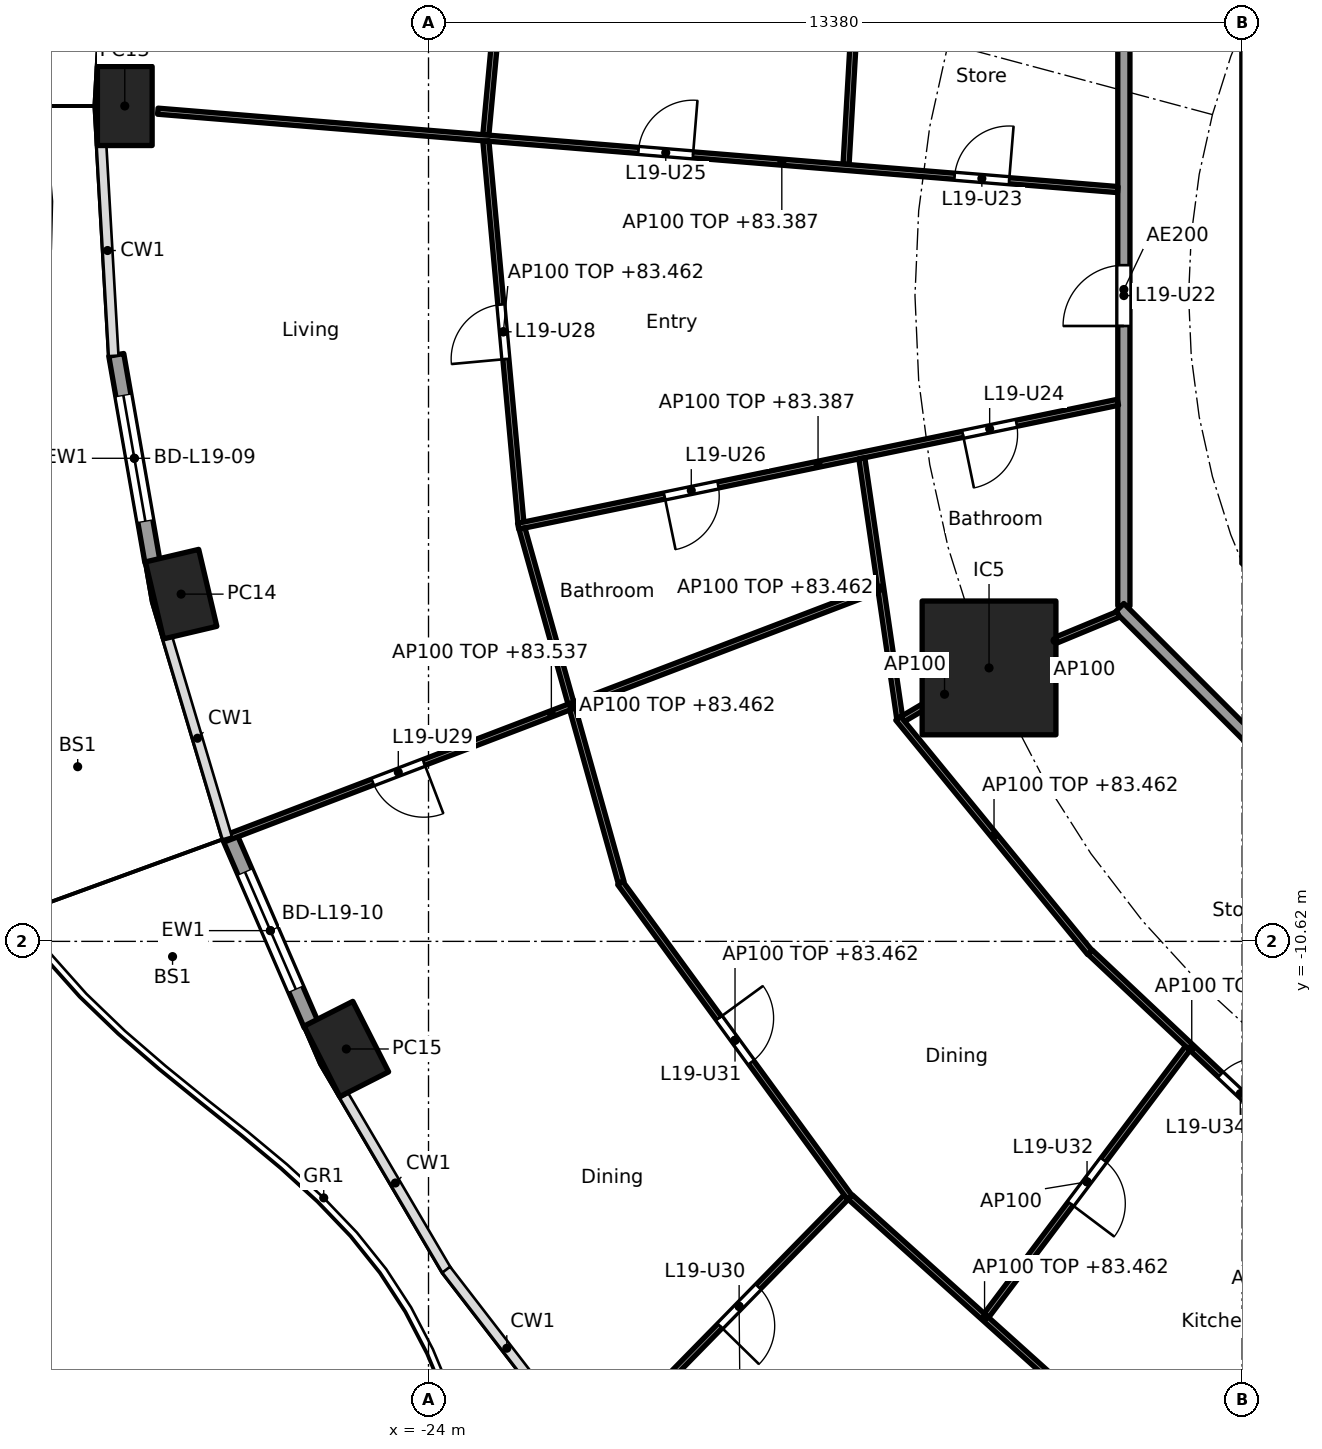
"""IFC4 building model, lengths in metres.
Left out: names, types, materials, properties, quantities, classifications, styles, units other than length and angle.
Written with IfcOpenShell. Run it as: python <this file> out.ifc"""

import sys

from ifc_helpers import new_model, si_unit, direction, frame, frame_2d, origin, origin_2d, place, context, subcontext, project, spatial, polyline, rectangle, hollow_rectangle, outline, extrude, element, fill, save


model = new_model("IFC4")
c1 = context("Model", 3, precision=1e-05, world=origin(), true_north=direction((0.0, 1.0)))
c2 = subcontext(c1, "Body", "Model", "MODEL_VIEW")
j1 = project(units=[si_unit("LENGTHUNIT", "METRE"), si_unit("PLANEANGLEUNIT", "RADIAN")], contexts=[c1])
p1 = place(None, origin())
s1 = spatial("IfcSite", under=j1, at=p1, CompositionType="ELEMENT")
p2 = place(p1, origin())
s2 = spatial("IfcBuilding", under=s1, at=p2, CompositionType="ELEMENT")
p3 = place(p2, frame((0.0, 0.0, 80.7)))
s3 = spatial("IfcBuildingStorey", under=s2, at=p3, CompositionType="ELEMENT", Elevation=80.7)
for number, where, z_axis, x_axis in (
    (1, (-28.995, 3.118, 0.0), (0.0, 0.0, 1.0), (0.0, -1.0, 0.0)),
    (2, (-28.068, -4.91, 0.0), (0.0, 0.0, 1.0), (0.229, -0.973, 0.0)),
    (3, (-25.352, -12.39, 0.0), (0.0, 0.0, 1.0), (0.452, -0.892, 0.0)),
):
    element("IfcColumn", number, at=place(p3, frame(where, z_axis=z_axis, x_axis=x_axis)), inside=s3, PredefinedType="COLUMN", context=c2, shape_type="SweptSolid", body=[
        extrude(hollow_rectangle(XDim=1.3, YDim=0.9, WallThickness=0.045, at=origin_2d()), origin(), (0.0, 0.0, 1.0), 3.7),
    ])
p4 = place(p3, frame((-14.782, -6.123, 0.0), z_axis=(0.0, 0.0, 1.0), x_axis=(1.0, 0.0, 0.0)))
e4 = element("IfcColumn", 4, at=p4, inside=s3, PredefinedType="COLUMN", context=c2, shape_type="SweptSolid", body=[
    extrude(rectangle(XDim=2.2, YDim=2.2, at=origin_2d()), origin(), (0.0, 0.0, 1.0), 3.7),
])
p5 = place(p3, frame((-28.54, -4.377, 0.0), z_axis=(0.0, 0.0, 1.0), x_axis=(-0.17223289558, 0.985056257114, 0.0)))
e5 = element("IfcWall", 5, at=p5, inside=s3, PredefinedType="SOLIDWALL", context=c2, shape_type="SweptSolid", body=[
    extrude(rectangle(XDim=3.454, YDim=0.25, at=frame_2d((1.727, 0.0))), origin(), (0.0, 0.0, 1.0), 3.44),
])
p6 = place(p5, frame((0.677, 0.0, 0.0)))
e6 = element("IfcOpeningElement", 6, at=p6, cuts=e5, PredefinedType="OPENING", context=c2, shape_type="SweptSolid", body=[
    extrude(rectangle(XDim=2.1, YDim=2.4, at=frame_2d((1.05, 1.2))), frame((0.0, 0.135, 0.0), z_axis=(0.0, -1.0, 0.0), x_axis=(1.0, 0.0, 0.0)), (0.0, 0.0, 1.0), 0.27),
])
p7 = place(p3, frame((-25.928, -11.994, 0.0), z_axis=(0.0, 0.0, 1.0), x_axis=(-0.397682447205, 0.917523117521, 0.0)))
e7 = element("IfcWall", 7, at=p7, inside=s3, PredefinedType="SOLIDWALL", context=c2, shape_type="SweptSolid", body=[
    extrude(rectangle(XDim=3.38, YDim=0.25, at=frame_2d((1.69, 0.0))), origin(), (0.0, 0.0, 1.0), 3.44),
])
p8 = place(p7, frame((0.64, 0.0, 0.0)))
e8 = element("IfcOpeningElement", 8, at=p8, cuts=e7, PredefinedType="OPENING", context=c2, shape_type="SweptSolid", body=[
    extrude(rectangle(XDim=2.1, YDim=2.4, at=frame_2d((1.05, 1.2))), frame((0.0, 0.135, 0.0), z_axis=(0.0, -1.0, 0.0), x_axis=(1.0, 0.0, 0.0)), (0.0, 0.0, 1.0), 0.27),
])
p9 = place(p3, frame((-10.325, 3.801, 0.0), z_axis=(0.0, 0.0, 1.0), x_axis=(0.0, -1.0, 0.0)))
e9 = element("IfcWall", 9, at=p9, inside=s3, PredefinedType="SHEAR", context=c2, shape_type="SweptSolid", body=[
    extrude(rectangle(XDim=7.602, YDim=0.6, at=frame_2d((3.801, 0.0))), origin(), (0.0, 0.0, 1.0), 3.44),
])
p10 = place(p9, frame((0.651, 0.0, 0.0)))
e10 = element("IfcOpeningElement", 10, at=p10, cuts=e9, PredefinedType="OPENING", context=c2, shape_type="SweptSolid", body=[
    extrude(rectangle(XDim=1.5, YDim=2.1, at=frame_2d((0.75, 1.05))), frame((0.0, 0.31, 0.0), z_axis=(0.0, -1.0, 0.0), x_axis=(1.0, 0.0, 0.0)), (0.0, 0.0, 1.0), 0.62),
])
p11 = place(p9, frame((5.451, 0.0, 0.0)))
e11 = element("IfcOpeningElement", 11, at=p11, cuts=e9, PredefinedType="OPENING", context=c2, shape_type="SweptSolid", body=[
    extrude(rectangle(XDim=1.5, YDim=2.1, at=frame_2d((0.75, 1.05))), frame((0.0, 0.31, 0.0), z_axis=(0.0, -1.0, 0.0), x_axis=(1.0, 0.0, 0.0)), (0.0, 0.0, 1.0), 0.62),
])
p12 = place(p3, origin())
e12 = element("IfcWall", 12, at=p12, inside=s3, PredefinedType="SHEAR", context=c2, shape_type="SweptSolid", body=[
    extrude(outline(polyline([(-10.625, -3.801), (-10.025, -3.801), (-10.025, -4.152), (-9.776, -4.401), (-10.2, -4.825), (-10.625, -4.401), (-10.625, -3.801)])), origin(), (0.0, 0.0, 1.0), 3.44),
])
p13 = place(p3, origin())
e13 = element("IfcWall", 13, at=p13, inside=s3, PredefinedType="SHEAR", context=c2, shape_type="SweptSolid", body=[
    extrude(outline(polyline([(-10.2, 4.825), (-9.776, 4.401), (-10.025, 4.152), (-10.025, 3.801), (-10.625, 3.801), (-10.625, 4.401), (-10.2, 4.825)])), origin(), (0.0, 0.0, 1.0), 3.44),
])
p14 = place(p3, frame((-12.565, 5.304, 0.0), z_axis=(0.0, 0.0, 1.0), x_axis=(0.0, -1.0, 0.0)))
e14 = element("IfcWall", 14, at=p14, inside=s3, PredefinedType="PARTITIONING", context=c2, shape_type="SweptSolid", body=[
    extrude(rectangle(XDim=10.409, YDim=0.2, at=frame_2d((5.205, 0.0))), origin(), (0.0, 0.0, 1.0), 3.44),
])
p15 = place(p14, frame((4.804, 0.0, 0.0)))
e15 = element("IfcOpeningElement", 15, at=p15, cuts=e14, PredefinedType="OPENING", context=c2, shape_type="SweptSolid", body=[
    extrude(rectangle(XDim=1.0, YDim=2.1, at=frame_2d((0.5, 1.05))), frame((0.0, 0.11, 0.0), z_axis=(0.0, -1.0, 0.0), x_axis=(1.0, 0.0, 0.0)), (0.0, 0.0, 1.0), 0.22),
])
p16 = place(p3, frame((-12.635, -5.134, 0.0), z_axis=(0.0, 0.0, 1.0), x_axis=(0.707106781187, -0.707106781187, 0.0)))
e16 = element("IfcWall", 16, at=p16, inside=s3, PredefinedType="PARTITIONING", context=c2, shape_type="SweptSolid", body=[
    extrude(rectangle(XDim=10.609, YDim=0.2, at=frame_2d((5.305, 0.0))), origin(), (0.0, 0.0, 1.0), 3.44),
])
p17 = place(p3, frame((-16.865, 6.8, 0.0), z_axis=(0.0, 0.0, 1.0), x_axis=(-0.057758567218, -0.998330580476, 0.0)))
e17 = element("IfcWall", 17, at=p17, inside=s3, PredefinedType="PARTITIONING", context=c2, shape_type="SweptSolid", body=[
    extrude(rectangle(XDim=4.65, YDim=0.1, at=frame_2d((2.325, 0.0))), origin(), (0.0, 0.0, 1.0), 2.762),
])
p18 = place(p3, frame((-22.474, 8.898, 0.0), z_axis=(0.0, 0.0, 1.0), x_axis=(-0.092756864489, -0.995688788774, 0.0)))
e18 = element("IfcWall", 18, at=p18, inside=s3, PredefinedType="PARTITIONING", context=c2, shape_type="SweptSolid", body=[
    extrude(rectangle(XDim=6.283, YDim=0.1, at=frame_2d((3.141, 0.0))), origin(), (0.0, 0.0, 1.0), 2.762),
])
p19 = place(p18, frame((2.691, 0.0, 0.0)))
e19 = element("IfcOpeningElement", 19, at=p19, cuts=e18, PredefinedType="OPENING", context=c2, shape_type="SweptSolid", body=[
    extrude(rectangle(XDim=0.9, YDim=2.1, at=frame_2d((0.45, 1.05))), frame((0.0, 0.06, 0.0), z_axis=(0.0, -1.0, 0.0), x_axis=(1.0, 0.0, 0.0)), (0.0, 0.0, 1.0), 0.12),
])
p20 = place(p3, frame((-12.665, 1.743, 0.0), z_axis=(0.0, 0.0, 1.0), x_axis=(-0.996680482238, 0.081412630013, 0.0)))
e20 = element("IfcWall", 20, at=p20, inside=s3, PredefinedType="PARTITIONING", context=c2, shape_type="SweptSolid", body=[
    extrude(rectangle(XDim=15.84, YDim=0.1, at=frame_2d((7.92, 0.0))), origin(), (0.0, 0.0, 1.0), 2.687),
])
p21 = place(p20, frame((1.793, 0.0, 0.0)))
e21 = element("IfcOpeningElement", 21, at=p21, cuts=e20, PredefinedType="OPENING", context=c2, shape_type="SweptSolid", body=[
    extrude(rectangle(XDim=0.9, YDim=2.1, at=frame_2d((0.45, 1.05))), frame((0.0, 0.06, 0.0), z_axis=(0.0, -1.0, 0.0), x_axis=(1.0, 0.0, 0.0)), (0.0, 0.0, 1.0), 0.12),
])
p22 = place(p20, frame((7.009, 0.0, 0.0)))
e22 = element("IfcOpeningElement", 22, at=p22, cuts=e20, PredefinedType="OPENING", context=c2, shape_type="SweptSolid", body=[
    extrude(rectangle(XDim=0.9, YDim=2.1, at=frame_2d((0.45, 1.05))), frame((0.0, 0.06, 0.0), z_axis=(0.0, -1.0, 0.0), x_axis=(1.0, 0.0, 0.0)), (0.0, 0.0, 1.0), 0.12),
])
p23 = place(p3, frame((-23.057, 2.542, 0.0), z_axis=(0.0, 0.0, 1.0), x_axis=(0.091380945427, -0.995816008514, 0.0)))
e23 = element("IfcWall", 23, at=p23, inside=s3, PredefinedType="PARTITIONING", context=c2, shape_type="SweptSolid", body=[
    extrude(rectangle(XDim=6.302, YDim=0.1, at=frame_2d((3.151, 0.0))), origin(), (0.0, 0.0, 1.0), 2.762),
])
p24 = place(p23, frame((2.701, 0.0, 0.0)))
e24 = element("IfcOpeningElement", 24, at=p24, cuts=e23, PredefinedType="OPENING", context=c2, shape_type="SweptSolid", body=[
    extrude(rectangle(XDim=0.9, YDim=2.1, at=frame_2d((0.45, 1.05))), frame((0.0, 0.06, 0.0), z_axis=(0.0, -1.0, 0.0), x_axis=(1.0, 0.0, 0.0)), (0.0, 0.0, 1.0), 0.12),
])
p25 = place(p3, frame((-12.663, -1.755, 0.0), z_axis=(0.0, 0.0, 1.0), x_axis=(-0.979304677471, -0.202391572657, 0.0)))
e25 = element("IfcWall", 25, at=p25, inside=s3, PredefinedType="PARTITIONING", context=c2, shape_type="SweptSolid", body=[
    extrude(rectangle(XDim=10.071, YDim=0.1, at=frame_2d((5.036, 0.0))), origin(), (0.0, 0.0, 1.0), 2.687),
])
p26 = place(p25, frame((1.704, 0.0, 0.0)))
e26 = element("IfcOpeningElement", 26, at=p26, cuts=e25, PredefinedType="OPENING", context=c2, shape_type="SweptSolid", body=[
    extrude(rectangle(XDim=0.9, YDim=2.1, at=frame_2d((0.45, 1.05))), frame((0.0, 0.06, 0.0), z_axis=(0.0, -1.0, 0.0), x_axis=(1.0, 0.0, 0.0)), (0.0, 0.0, 1.0), 0.12),
])
p27 = place(p25, frame((6.714, 0.0, 0.0)))
e27 = element("IfcOpeningElement", 27, at=p27, cuts=e25, PredefinedType="OPENING", context=c2, shape_type="SweptSolid", body=[
    extrude(rectangle(XDim=0.9, YDim=2.1, at=frame_2d((0.45, 1.05))), frame((0.0, 0.06, 0.0), z_axis=(0.0, -1.0, 0.0), x_axis=(1.0, 0.0, 0.0)), (0.0, 0.0, 1.0), 0.12),
])
p28 = place(p3, frame((-16.874, -2.677, 0.0), z_axis=(0.0, 0.0, 1.0), x_axis=(0.144260658133, -0.989539722555, 0.0)))
e28 = element("IfcWall", 28, at=p28, inside=s3, PredefinedType="PARTITIONING", context=c2, shape_type="SweptSolid", body=[
    extrude(rectangle(XDim=4.309, YDim=0.1, at=frame_2d((2.154, 0.0))), origin(), (0.0, 0.0, 1.0), 2.762),
])
p29 = place(p3, frame((-22.463, -3.832, 0.0), z_axis=(0.0, 0.0, 1.0), x_axis=(0.269797759333, -0.962917010473, 0.0)))
e29 = element("IfcWall", 29, at=p29, inside=s3, PredefinedType="PARTITIONING", context=c2, shape_type="SweptSolid", body=[
    extrude(rectangle(XDim=6.043, YDim=0.1, at=frame_2d((3.021, 0.0))), origin(), (0.0, 0.0, 1.0), 2.762),
])
p30 = place(p3, frame((-16.61, -4.826, 0.0), z_axis=(0.0, 0.0, 1.0), x_axis=(-0.934174502909, -0.356816476798, 0.0)))
e30 = element("IfcWall", 30, at=p30, inside=s3, PredefinedType="PARTITIONING", context=c2, shape_type="SweptSolid", body=[
    extrude(rectangle(XDim=11.496, YDim=0.1, at=frame_2d((5.748, 0.0))), origin(), (0.0, 0.0, 1.0), 2.837),
])
p31 = place(p30, frame((7.993, 0.0, 0.0)))
e31 = element("IfcOpeningElement", 31, at=p31, cuts=e30, PredefinedType="OPENING", context=c2, shape_type="SweptSolid", body=[
    extrude(rectangle(XDim=0.9, YDim=2.1, at=frame_2d((0.45, 1.05))), frame((0.0, 0.06, 0.0), z_axis=(0.0, -1.0, 0.0), x_axis=(1.0, 0.0, 0.0)), (0.0, 0.0, 1.0), 0.12),
])
p32 = place(p3, frame((-12.657, -5.243, 0.0), z_axis=(0.0, 0.0, 1.0), x_axis=(-0.923864733477, -0.382719158442, 0.0)))
e32 = element("IfcWall", 32, at=p32, inside=s3, PredefinedType="PARTITIONING", context=c2, shape_type="SweptSolid", body=[
    extrude(rectangle(XDim=2.25, YDim=0.1, at=frame_2d((1.125, 0.0))), origin(), (0.0, 0.0, 1.0), 3.44),
])
p33 = place(p3, frame((-14.825, -6.148, 0.0), z_axis=(0.0, 0.0, 1.0), x_axis=(-0.860452514841, -0.509530636669, 0.0)))
e33 = element("IfcWall", 33, at=p33, inside=s3, PredefinedType="PARTITIONING", context=c2, shape_type="SweptSolid", body=[
    extrude(rectangle(XDim=1.601, YDim=0.1, at=frame_2d((0.8, 0.0))), origin(), (0.0, 0.0, 1.0), 3.44),
])
p34 = place(p3, frame((-16.277, -6.951, 0.0), z_axis=(0.0, 0.0, 1.0), x_axis=(0.633427340372, -0.773802173988, 0.0)))
e34 = element("IfcWall", 34, at=p34, inside=s3, PredefinedType="PARTITIONING", context=c2, shape_type="SweptSolid", body=[
    extrude(rectangle(XDim=4.979, YDim=0.1, at=frame_2d((2.49, 0.0))), origin(), (0.0, 0.0, 1.0), 2.762),
])
p35 = place(p3, frame((-20.848, -9.658, 0.0), z_axis=(0.0, 0.0, 1.0), x_axis=(0.5895799361, -0.807710033953, 0.0)))
e35 = element("IfcWall", 35, at=p35, inside=s3, PredefinedType="PARTITIONING", context=c2, shape_type="SweptSolid", body=[
    extrude(rectangle(XDim=6.408, YDim=0.1, at=frame_2d((3.204, 0.0))), origin(), (0.0, 0.0, 1.0), 2.762),
])
p36 = place(p35, frame((2.754, 0.0, 0.0)))
e36 = element("IfcOpeningElement", 36, at=p36, cuts=e35, PredefinedType="OPENING", context=c2, shape_type="SweptSolid", body=[
    extrude(rectangle(XDim=0.9, YDim=2.1, at=frame_2d((0.45, 1.05))), frame((0.0, 0.06, 0.0), z_axis=(0.0, -1.0, 0.0), x_axis=(1.0, 0.0, 0.0)), (0.0, 0.0, 1.0), 0.12),
])
p37 = place(p3, frame((-13.118, -10.8, 0.0), z_axis=(0.0, 0.0, 1.0), x_axis=(0.72818280142, -0.685382964273, 0.0)))
e37 = element("IfcWall", 37, at=p37, inside=s3, PredefinedType="PARTITIONING", context=c2, shape_type="SweptSolid", body=[
    extrude(rectangle(XDim=4.586, YDim=0.1, at=frame_2d((2.293, 0.0))), origin(), (0.0, 0.0, 1.0), 2.762),
])
p38 = place(p37, frame((2.94, 0.0, 0.0)))
e38 = element("IfcOpeningElement", 38, at=p38, cuts=e37, PredefinedType="OPENING", context=c2, shape_type="SweptSolid", body=[
    extrude(rectangle(XDim=0.9, YDim=2.1, at=frame_2d((0.45, 1.05))), frame((0.0, 0.06, 0.0), z_axis=(0.0, -1.0, 0.0), x_axis=(1.0, 0.0, 0.0)), (0.0, 0.0, 1.0), 0.12),
])
p39 = place(p3, frame((-17.135, -14.829, 0.0), z_axis=(0.0, 0.0, 1.0), x_axis=(-0.699702869429, -0.714433967917, 0.0)))
e39 = element("IfcWall", 39, at=p39, inside=s3, PredefinedType="PARTITIONING", context=c2, shape_type="SweptSolid", body=[
    extrude(rectangle(XDim=5.022, YDim=0.1, at=frame_2d((2.511, 0.0))), origin(), (0.0, 0.0, 1.0), 2.762),
])
p40 = place(p39, frame((2.061, 0.0, 0.0)))
e40 = element("IfcOpeningElement", 40, at=p40, cuts=e39, PredefinedType="OPENING", context=c2, shape_type="SweptSolid", body=[
    extrude(rectangle(XDim=0.9, YDim=2.1, at=frame_2d((0.45, 1.05))), frame((0.0, 0.06, 0.0), z_axis=(0.0, -1.0, 0.0), x_axis=(1.0, 0.0, 0.0)), (0.0, 0.0, 1.0), 0.12),
])
p41 = place(p3, frame((-17.063, -14.827, 0.0), z_axis=(0.0, 0.0, 1.0), x_axis=(0.743478142868, -0.668760234373, 0.0)))
e41 = element("IfcWall", 41, at=p41, inside=s3, PredefinedType="PARTITIONING", context=c2, shape_type="SweptSolid", body=[
    extrude(rectangle(XDim=5.937, YDim=0.1, at=frame_2d((2.969, 0.0))), origin(), (0.0, 0.0, 1.0), 2.762),
])
p42 = place(p3, frame((-11.515, -12.377, 0.0), z_axis=(0.0, 0.0, 1.0), x_axis=(-0.60163860397, -0.798768420891, 0.0)))
e42 = element("IfcWall", 42, at=p42, inside=s3, PredefinedType="PARTITIONING", context=c2, shape_type="SweptSolid", body=[
    extrude(rectangle(XDim=5.502, YDim=0.1, at=frame_2d((2.751, 0.0))), origin(), (0.0, 0.0, 1.0), 3.44),
])
p43 = place(p42, frame((2.301, 0.0, 0.0)))
e43 = element("IfcOpeningElement", 43, at=p43, cuts=e42, PredefinedType="OPENING", context=c2, shape_type="SweptSolid", body=[
    extrude(rectangle(XDim=0.9, YDim=2.1, at=frame_2d((0.45, 1.05))), frame((0.0, 0.06, 0.0), z_axis=(0.0, -1.0, 0.0), x_axis=(1.0, 0.0, 0.0)), (0.0, 0.0, 1.0), 0.12),
])
p44 = place(p6, origin())
e44 = element("IfcDoor", 44, at=p44, inside=s3, OperationType="SLIDING_TO_LEFT", PredefinedType="DOOR", context=c2, shape_type="SweptSolid", body=[
    extrude(rectangle(XDim=2.1, YDim=2.4, at=frame_2d((1.05, 1.2))), frame((0.0, 0.025, 0.0), z_axis=(0.0, -1.0, 0.0), x_axis=(1.0, 0.0, 0.0)), (0.0, 0.0, 1.0), 0.05),
])
fill(e6, e44)
p45 = place(p8, origin())
e45 = element("IfcDoor", 45, at=p45, inside=s3, OperationType="SLIDING_TO_LEFT", PredefinedType="DOOR", context=c2, shape_type="SweptSolid", body=[
    extrude(rectangle(XDim=2.1, YDim=2.4, at=frame_2d((1.05, 1.2))), frame((0.0, 0.025, 0.0), z_axis=(0.0, -1.0, 0.0), x_axis=(1.0, 0.0, 0.0)), (0.0, 0.0, 1.0), 0.05),
])
fill(e8, e45)
p46 = place(p15, frame((1.0, 0.0, 0.0), x_axis=(-1.0, 0.0, 0.0)))
e46 = element("IfcDoor", 46, at=p46, inside=s3, OperationType="SINGLE_SWING_LEFT", PredefinedType="DOOR", context=c2, shape_type="SweptSolid", body=[
    extrude(rectangle(XDim=1.0, YDim=2.1, at=frame_2d((0.5, 1.05))), frame((0.0, 0.025, 0.0), z_axis=(0.0, -1.0, 0.0), x_axis=(1.0, 0.0, 0.0)), (0.0, 0.0, 1.0), 0.05),
])
fill(e15, e46)
p47 = place(p21, frame((0.9, 0.0, 0.0), x_axis=(-1.0, 0.0, 0.0)))
e47 = element("IfcDoor", 47, at=p47, inside=s3, OperationType="SINGLE_SWING_RIGHT", PredefinedType="DOOR", context=c2, shape_type="SweptSolid", body=[
    extrude(rectangle(XDim=0.9, YDim=2.1, at=frame_2d((0.45, 1.05))), frame((0.0, 0.025, 0.0), z_axis=(0.0, -1.0, 0.0), x_axis=(1.0, 0.0, 0.0)), (0.0, 0.0, 1.0), 0.05),
])
fill(e21, e47)
p48 = place(p26, origin())
e48 = element("IfcDoor", 48, at=p48, inside=s3, OperationType="SINGLE_SWING_RIGHT", PredefinedType="DOOR", context=c2, shape_type="SweptSolid", body=[
    extrude(rectangle(XDim=0.9, YDim=2.1, at=frame_2d((0.45, 1.05))), frame((0.0, 0.025, 0.0), z_axis=(0.0, -1.0, 0.0), x_axis=(1.0, 0.0, 0.0)), (0.0, 0.0, 1.0), 0.05),
])
fill(e26, e48)
p49 = place(p22, frame((0.9, 0.0, 0.0), x_axis=(-1.0, 0.0, 0.0)))
e49 = element("IfcDoor", 49, at=p49, inside=s3, OperationType="SINGLE_SWING_RIGHT", PredefinedType="DOOR", context=c2, shape_type="SweptSolid", body=[
    extrude(rectangle(XDim=0.9, YDim=2.1, at=frame_2d((0.45, 1.05))), frame((0.0, 0.025, 0.0), z_axis=(0.0, -1.0, 0.0), x_axis=(1.0, 0.0, 0.0)), (0.0, 0.0, 1.0), 0.05),
])
fill(e22, e49)
p50 = place(p27, origin())
e50 = element("IfcDoor", 50, at=p50, inside=s3, OperationType="SINGLE_SWING_RIGHT", PredefinedType="DOOR", context=c2, shape_type="SweptSolid", body=[
    extrude(rectangle(XDim=0.9, YDim=2.1, at=frame_2d((0.45, 1.05))), frame((0.0, 0.025, 0.0), z_axis=(0.0, -1.0, 0.0), x_axis=(1.0, 0.0, 0.0)), (0.0, 0.0, 1.0), 0.05),
])
fill(e27, e50)
p51 = place(p24, frame((0.9, 0.0, 0.0), x_axis=(-1.0, 0.0, 0.0)))
e51 = element("IfcDoor", 51, at=p51, inside=s3, OperationType="SINGLE_SWING_LEFT", PredefinedType="DOOR", context=c2, shape_type="SweptSolid", body=[
    extrude(rectangle(XDim=0.9, YDim=2.1, at=frame_2d((0.45, 1.05))), frame((0.0, 0.025, 0.0), z_axis=(0.0, -1.0, 0.0), x_axis=(1.0, 0.0, 0.0)), (0.0, 0.0, 1.0), 0.05),
])
fill(e24, e51)
p52 = place(p31, origin())
e52 = element("IfcDoor", 52, at=p52, inside=s3, OperationType="SINGLE_SWING_LEFT", PredefinedType="DOOR", context=c2, shape_type="SweptSolid", body=[
    extrude(rectangle(XDim=0.9, YDim=2.1, at=frame_2d((0.45, 1.05))), frame((0.0, 0.025, 0.0), z_axis=(0.0, -1.0, 0.0), x_axis=(1.0, 0.0, 0.0)), (0.0, 0.0, 1.0), 0.05),
])
fill(e31, e52)
p53 = place(p40, origin())
e53 = element("IfcDoor", 53, at=p53, inside=s3, OperationType="SINGLE_SWING_RIGHT", PredefinedType="DOOR", context=c2, shape_type="SweptSolid", body=[
    extrude(rectangle(XDim=0.9, YDim=2.1, at=frame_2d((0.45, 1.05))), frame((0.0, 0.025, 0.0), z_axis=(0.0, -1.0, 0.0), x_axis=(1.0, 0.0, 0.0)), (0.0, 0.0, 1.0), 0.05),
])
fill(e40, e53)
p54 = place(p36, origin())
e54 = element("IfcDoor", 54, at=p54, inside=s3, OperationType="SINGLE_SWING_LEFT", PredefinedType="DOOR", context=c2, shape_type="SweptSolid", body=[
    extrude(rectangle(XDim=0.9, YDim=2.1, at=frame_2d((0.45, 1.05))), frame((0.0, 0.025, 0.0), z_axis=(0.0, -1.0, 0.0), x_axis=(1.0, 0.0, 0.0)), (0.0, 0.0, 1.0), 0.05),
])
fill(e36, e54)
p55 = place(p43, origin())
e55 = element("IfcDoor", 55, at=p55, inside=s3, OperationType="SINGLE_SWING_RIGHT", PredefinedType="DOOR", context=c2, shape_type="SweptSolid", body=[
    extrude(rectangle(XDim=0.9, YDim=2.1, at=frame_2d((0.45, 1.05))), frame((0.0, 0.025, 0.0), z_axis=(0.0, -1.0, 0.0), x_axis=(1.0, 0.0, 0.0)), (0.0, 0.0, 1.0), 0.05),
])
fill(e43, e55)
p56 = place(p38, origin())
e56 = element("IfcDoor", 56, at=p56, inside=s3, OperationType="SINGLE_SWING_RIGHT", PredefinedType="DOOR", context=c2, shape_type="SweptSolid", body=[
    extrude(rectangle(XDim=0.9, YDim=2.1, at=frame_2d((0.45, 1.05))), frame((0.0, 0.025, 0.0), z_axis=(0.0, -1.0, 0.0), x_axis=(1.0, 0.0, 0.0)), (0.0, 0.0, 1.0), 0.05),
])
fill(e38, e56)
save(model, sys.argv[1])
